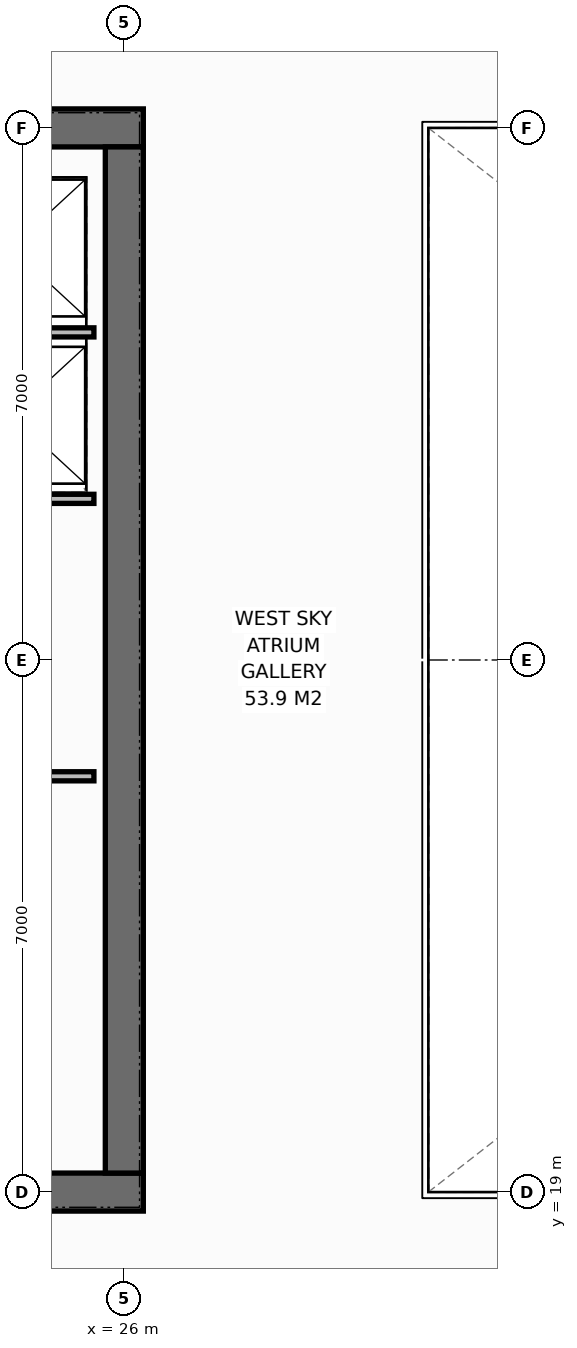
"""IFC4 building model, lengths in metres.
Left out: names, types, materials, properties, quantities, classifications, styles, units other than length and angle.
Written with IfcOpenShell. Run it as: python <this file> out.ifc"""

import sys

from ifc_helpers import new_model, si_unit, direction, frame, frame_2d, origin, place, context, subcontext, project, spatial, rectangle, extrude, element, save


model = new_model("IFC4")
c1 = context("Model", 3, precision=1e-05, world=origin(), true_north=direction((0.0, 1.0)))
c2 = subcontext(c1, "Body", "Model", "MODEL_VIEW")
j1 = project(units=[si_unit("LENGTHUNIT", "METRE"), si_unit("PLANEANGLEUNIT", "RADIAN")], contexts=[c1])
p1 = place(None, origin())
s1 = spatial("IfcSite", under=j1, at=p1, CompositionType="ELEMENT")
p2 = place(p1, origin())
s2 = spatial("IfcBuilding", under=s1, at=p2, CompositionType="ELEMENT")
p3 = place(p2, frame((0.0, 0.0, 290.4)))
s3 = spatial("IfcBuildingStorey", under=s2, at=p3, CompositionType="ELEMENT", Elevation=290.4)
p4 = place(p3, frame((12.75, 19.0, 0.0), z_axis=(0.0, 0.0, 1.0), x_axis=(1.0, 0.0, 0.0)))
e1 = element("IfcWall", 1, at=p4, inside=s3, PredefinedType="SHEAR", context=c2, shape_type="SweptSolid", body=[
    extrude(rectangle(XDim=13.5, YDim=0.5, at=frame_2d((6.75, 0.0))), origin(), (0.0, 0.0, 1.0), 4.0),
])
p5 = place(p4, frame((9.13, 0.0, 0.0)))
e2 = element("IfcOpeningElement", 2, at=p5, cuts=e1, PredefinedType="OPENING", context=c2, shape_type="SweptSolid", body=[
    extrude(rectangle(XDim=1.4, YDim=2.2, at=frame_2d((0.7, 1.1))), frame((0.0, 0.26, 0.0), z_axis=(0.0, -1.0, 0.0), x_axis=(1.0, 0.0, 0.0)), (0.0, 0.0, 1.0), 0.52),
])
p6 = place(p3, frame((12.75, 33.0, 0.0), z_axis=(0.0, 0.0, 1.0), x_axis=(1.0, 0.0, 0.0)))
e3 = element("IfcWall", 3, at=p6, inside=s3, PredefinedType="SHEAR", context=c2, shape_type="SweptSolid", body=[
    extrude(rectangle(XDim=13.5, YDim=0.5, at=frame_2d((6.75, 0.0))), origin(), (0.0, 0.0, 1.0), 4.0),
])
p7 = place(p6, frame((1.15, 0.0, 0.0)))
e4 = element("IfcOpeningElement", 4, at=p7, cuts=e3, PredefinedType="OPENING", context=c2, shape_type="SweptSolid", body=[
    extrude(rectangle(XDim=0.9, YDim=2.15, at=frame_2d((0.45, 1.075))), frame((0.0, 0.26, 0.0), z_axis=(0.0, -1.0, 0.0), x_axis=(1.0, 0.0, 0.0)), (0.0, 0.0, 1.0), 0.52),
])
p8 = place(p6, frame((3.75, 0.0, 0.0)))
e5 = element("IfcOpeningElement", 5, at=p8, cuts=e3, PredefinedType="OPENING", context=c2, shape_type="SweptSolid", body=[
    extrude(rectangle(XDim=0.95, YDim=2.15, at=frame_2d((0.475, 1.075))), frame((0.0, 0.26, 0.0), z_axis=(0.0, -1.0, 0.0), x_axis=(1.0, 0.0, 0.0)), (0.0, 0.0, 1.0), 0.52),
])
p9 = place(p6, frame((6.75, 0.0, 0.0)))
e6 = element("IfcOpeningElement", 6, at=p9, cuts=e3, PredefinedType="OPENING", context=c2, shape_type="SweptSolid", body=[
    extrude(rectangle(XDim=0.95, YDim=2.15, at=frame_2d((0.475, 1.075))), frame((0.0, 0.26, 0.0), z_axis=(0.0, -1.0, 0.0), x_axis=(1.0, 0.0, 0.0)), (0.0, 0.0, 1.0), 0.52),
])
p10 = place(p6, frame((9.13, 0.0, 0.0)))
e7 = element("IfcOpeningElement", 7, at=p10, cuts=e3, PredefinedType="OPENING", context=c2, shape_type="SweptSolid", body=[
    extrude(rectangle(XDim=1.4, YDim=2.2, at=frame_2d((0.7, 1.1))), frame((0.0, 0.26, 0.0), z_axis=(0.0, -1.0, 0.0), x_axis=(1.0, 0.0, 0.0)), (0.0, 0.0, 1.0), 0.52),
])
p11 = place(p3, frame((26.0, 19.25, 0.0), z_axis=(0.0, 0.0, 1.0), x_axis=(0.0, 1.0, 0.0)))
e8 = element("IfcWall", 8, at=p11, inside=s3, PredefinedType="SHEAR", context=c2, shape_type="SweptSolid", body=[
    extrude(rectangle(XDim=13.5, YDim=0.5, at=frame_2d((6.75, 0.0))), origin(), (0.0, 0.0, 1.0), 4.0),
])
for number, where, z_axis, x_axis in (
    (9, (23.4, 24.47, 0.0), (0.0, 0.0, 1.0), (1.0, 0.0, 0.0)),
    (10, (23.4, 28.12, 0.0), (0.0, 0.0, 1.0), (1.0, 0.0, 0.0)),
    (11, (23.4, 30.31, 0.0), (0.0, 0.0, 1.0), (1.0, 0.0, 0.0)),
):
    element("IfcWall", number, at=place(p3, frame(where, z_axis=z_axis, x_axis=x_axis)), inside=s3, PredefinedType="PARTITIONING", context=c2, shape_type="SweptSolid", body=[
        extrude(rectangle(XDim=2.2, YDim=0.12, at=frame_2d((1.1, 0.0))), origin(), (0.0, 0.0, 1.0), 3.788),
    ])
save(model, sys.argv[1])
